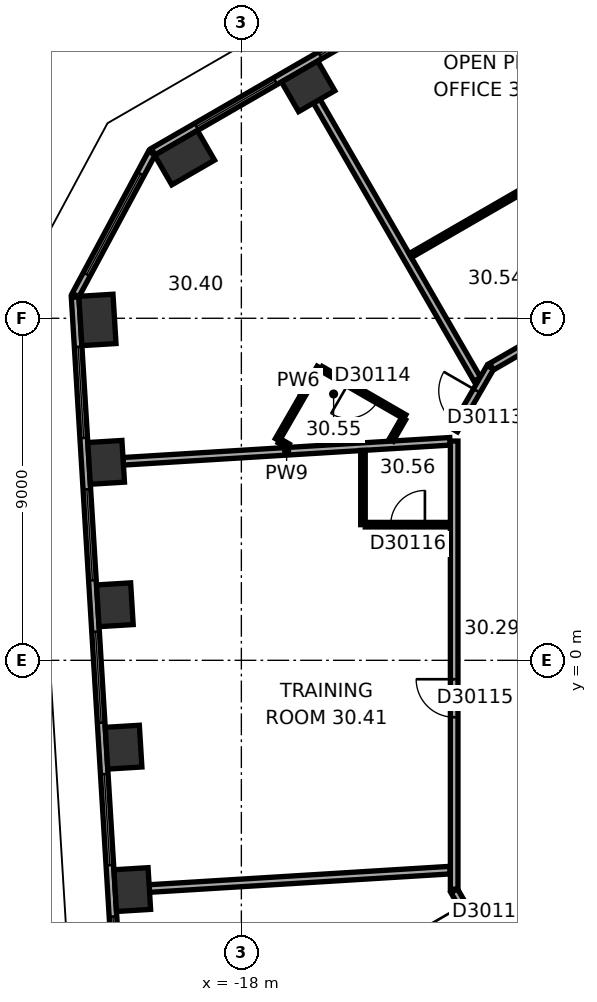
"""IFC4 building model, lengths in metres.
Left out: names, types, materials, properties, quantities, classifications, styles, units other than length and angle.
Written with IfcOpenShell. Run it as: python <this file> out.ifc"""

import sys

from ifc_helpers import new_model, si_unit, direction, frame, frame_2d, origin, origin_2d, place, context, subcontext, project, spatial, rectangle, extrude, element, fill, save


model = new_model("IFC4")
c1 = context("Model", 3, precision=1e-05, world=origin(), true_north=direction((0.0, 1.0)))
c2 = subcontext(c1, "Body", "Model", "MODEL_VIEW")
j1 = project(units=[si_unit("LENGTHUNIT", "METRE"), si_unit("PLANEANGLEUNIT", "RADIAN")], contexts=[c1])
p1 = place(None, origin())
s1 = spatial("IfcSite", under=j1, at=p1, CompositionType="ELEMENT")
p2 = place(p1, origin())
s2 = spatial("IfcBuilding", under=s1, at=p2, CompositionType="ELEMENT")
p3 = place(p2, frame((0.0, 0.0, 124.4)))
s3 = spatial("IfcBuildingStorey", under=s2, at=p3, CompositionType="ELEMENT", Elevation=124.4)
p4 = place(p3, frame((-16.242, 15.102, 0.0), z_axis=(0.0, 0.0, 1.0), x_axis=(-0.866025403784, -0.5, 0.0)))
e1 = element("IfcColumn", 1, at=p4, inside=s3, PredefinedType="COLUMN", context=c2, shape_type="SweptSolid", body=[
    extrude(rectangle(XDim=1.1, YDim=0.9, at=origin_2d()), origin(), (0.0, 0.0, 1.0), 3.7),
])
for number, where, z_axis, x_axis in (
    (2, (-19.494, 13.225, 0.0), (0.0, 0.0, 1.0), (-0.866, -0.5, 0.0)),
    (3, (-21.787, 8.956, 0.0), (0.0, 0.0, 1.0), (0.061, -0.998, 0.0)),
):
    element("IfcColumn", number, at=place(p3, frame(where, z_axis=z_axis, x_axis=x_axis)), inside=s3, PredefinedType="COLUMN", context=c2, shape_type="SweptSolid", body=[
        extrude(rectangle(XDim=1.3, YDim=0.9, at=origin_2d()), origin(), (0.0, 0.0, 1.0), 3.7),
    ])
for number, where, z_axis, x_axis in (
    (4, (-21.558, 5.209, 0.0), (0.0, 0.0, 1.0), (0.061, -0.998, 0.0)),
    (5, (-21.329, 1.462, 0.0), (0.0, 0.0, 1.0), (0.061, -0.998, 0.0)),
    (6, (-21.1, -2.285, 0.0), (0.0, 0.0, 1.0), (0.061, -0.998, 0.0)),
    (7, (-20.871, -6.032, 0.0), (0.0, 0.0, 1.0), (0.061, -0.998, 0.0)),
):
    element("IfcColumn", number, at=place(p3, frame(where, z_axis=z_axis, x_axis=x_axis)), inside=s3, PredefinedType="COLUMN", context=c2, shape_type="SweptSolid", body=[
        extrude(rectangle(XDim=1.1, YDim=0.9, at=origin_2d()), origin(), (0.0, 0.0, 1.0), 3.7),
    ])
p5 = place(p3, frame((-2.961, 23.405, 0.0), z_axis=(0.0, 0.0, 1.0), x_axis=(-0.866023315909, -0.500003616288, 0.0)))
e8 = element("IfcWall", 8, at=p5, inside=s3, PredefinedType="STANDARD", context=c2, shape_type="SweptSolid", body=[
    extrude(rectangle(XDim=20.044, YDim=0.2, at=frame_2d((10.022, 0.0))), origin(), (0.0, 0.0, 1.0), 3.7),
])
p6 = place(p5, frame((1.314, 0.0, 0.9)))
e9 = element("IfcOpeningElement", 9, at=p6, cuts=e8, PredefinedType="OPENING", context=c2, shape_type="SweptSolid", body=[
    extrude(rectangle(XDim=2.4, YDim=2.0, at=frame_2d((1.2, 1.0))), frame((0.0, 0.11, 0.0), z_axis=(0.0, -1.0, 0.0), x_axis=(1.0, 0.0, 0.0)), (0.0, 0.0, 1.0), 0.22),
])
p7 = place(p5, frame((5.069, 0.0, 0.9)))
e10 = element("IfcOpeningElement", 10, at=p7, cuts=e8, PredefinedType="OPENING", context=c2, shape_type="SweptSolid", body=[
    extrude(rectangle(XDim=2.4, YDim=2.0, at=frame_2d((1.2, 1.0))), frame((0.0, 0.11, 0.0), z_axis=(0.0, -1.0, 0.0), x_axis=(1.0, 0.0, 0.0)), (0.0, 0.0, 1.0), 0.22),
])
p8 = place(p5, frame((8.823, 0.0, 0.9)))
e11 = element("IfcOpeningElement", 11, at=p8, cuts=e8, PredefinedType="OPENING", context=c2, shape_type="SweptSolid", body=[
    extrude(rectangle(XDim=2.4, YDim=2.0, at=frame_2d((1.2, 1.0))), frame((0.0, 0.11, 0.0), z_axis=(0.0, -1.0, 0.0), x_axis=(1.0, 0.0, 0.0)), (0.0, 0.0, 1.0), 0.22),
])
p9 = place(p5, frame((12.577, 0.0, 0.9)))
e12 = element("IfcOpeningElement", 12, at=p9, cuts=e8, PredefinedType="OPENING", context=c2, shape_type="SweptSolid", body=[
    extrude(rectangle(XDim=2.4, YDim=2.0, at=frame_2d((1.2, 1.0))), frame((0.0, 0.11, 0.0), z_axis=(0.0, -1.0, 0.0), x_axis=(1.0, 0.0, 0.0)), (0.0, 0.0, 1.0), 0.22),
])
p10 = place(p5, frame((16.331, 0.0, 0.9)))
e13 = element("IfcOpeningElement", 13, at=p10, cuts=e8, PredefinedType="OPENING", context=c2, shape_type="SweptSolid", body=[
    extrude(rectangle(XDim=2.4, YDim=2.0, at=frame_2d((1.2, 1.0))), frame((0.0, 0.11, 0.0), z_axis=(0.0, -1.0, 0.0), x_axis=(1.0, 0.0, 0.0)), (0.0, 0.0, 1.0), 0.22),
])
p11 = place(p3, frame((-20.357, 13.344, 0.0), z_axis=(0.0, 0.0, 1.0), x_axis=(-0.473288913494, -0.880907262068, 0.0)))
e14 = element("IfcWall", 14, at=p11, inside=s3, PredefinedType="STANDARD", context=c2, shape_type="SweptSolid", body=[
    extrude(rectangle(XDim=4.238, YDim=0.2, at=frame_2d((2.119, 0.0))), origin(), (0.0, 0.0, 1.0), 3.7),
])
p12 = place(p11, frame((0.619, 0.0, 0.9)))
e15 = element("IfcOpeningElement", 15, at=p12, cuts=e14, PredefinedType="OPENING", context=c2, shape_type="SweptSolid", body=[
    extrude(rectangle(XDim=3.0, YDim=2.0, at=frame_2d((1.5, 1.0))), frame((0.0, 0.11, 0.0), z_axis=(0.0, -1.0, 0.0), x_axis=(1.0, 0.0, 0.0)), (0.0, 0.0, 1.0), 0.22),
])
p13 = place(p3, frame((-22.375, 9.557, 0.0), z_axis=(0.0, 0.0, 1.0), x_axis=(0.061036015339, -0.998135564356, 0.0)))
e16 = element("IfcWall", 16, at=p13, inside=s3, PredefinedType="STANDARD", context=c2, shape_type="SweptSolid", body=[
    extrude(rectangle(XDim=20.044, YDim=0.2, at=frame_2d((10.022, 0.0))), origin(), (0.0, 0.0, 1.0), 3.7),
])
p14 = place(p13, frame((1.313, 0.0, 0.9)))
e17 = element("IfcOpeningElement", 17, at=p14, cuts=e16, PredefinedType="OPENING", context=c2, shape_type="SweptSolid", body=[
    extrude(rectangle(XDim=2.4, YDim=2.0, at=frame_2d((1.2, 1.0))), frame((0.0, 0.11, 0.0), z_axis=(0.0, -1.0, 0.0), x_axis=(1.0, 0.0, 0.0)), (0.0, 0.0, 1.0), 0.22),
])
p15 = place(p13, frame((5.067, 0.0, 0.9)))
e18 = element("IfcOpeningElement", 18, at=p15, cuts=e16, PredefinedType="OPENING", context=c2, shape_type="SweptSolid", body=[
    extrude(rectangle(XDim=2.4, YDim=2.0, at=frame_2d((1.2, 1.0))), frame((0.0, 0.11, 0.0), z_axis=(0.0, -1.0, 0.0), x_axis=(1.0, 0.0, 0.0)), (0.0, 0.0, 1.0), 0.22),
])
p16 = place(p13, frame((8.821, 0.0, 0.9)))
e19 = element("IfcOpeningElement", 19, at=p16, cuts=e16, PredefinedType="OPENING", context=c2, shape_type="SweptSolid", body=[
    extrude(rectangle(XDim=2.4, YDim=2.0, at=frame_2d((1.2, 1.0))), frame((0.0, 0.11, 0.0), z_axis=(0.0, -1.0, 0.0), x_axis=(1.0, 0.0, 0.0)), (0.0, 0.0, 1.0), 0.22),
])
p17 = place(p13, frame((12.575, 0.0, 0.9)))
e20 = element("IfcOpeningElement", 20, at=p17, cuts=e16, PredefinedType="OPENING", context=c2, shape_type="SweptSolid", body=[
    extrude(rectangle(XDim=2.4, YDim=2.0, at=frame_2d((1.2, 1.0))), frame((0.0, 0.11, 0.0), z_axis=(0.0, -1.0, 0.0), x_axis=(1.0, 0.0, 0.0)), (0.0, 0.0, 1.0), 0.22),
])
p18 = place(p13, frame((16.329, 0.0, 0.9)))
e21 = element("IfcOpeningElement", 21, at=p18, cuts=e16, PredefinedType="OPENING", context=c2, shape_type="SweptSolid", body=[
    extrude(rectangle(XDim=2.4, YDim=2.0, at=frame_2d((1.2, 1.0))), frame((0.0, 0.11, 0.0), z_axis=(0.0, -1.0, 0.0), x_axis=(1.0, 0.0, 0.0)), (0.0, 0.0, 1.0), 0.22),
])
p19 = place(p3, frame((-21.109, 5.237, 0.0), z_axis=(0.0, 0.0, 1.0), x_axis=(0.998135264293, 0.061040922131, 0.0)))
e22 = element("IfcWall", 22, at=p19, inside=s3, PredefinedType="PARTITIONING", context=c2, shape_type="SweptSolid", body=[
    extrude(rectangle(XDim=8.615, YDim=0.2, at=frame_2d((4.308, 0.0))), origin(), (0.0, 0.0, 1.0), 3.42),
])
p20 = place(p3, frame((-20.421, -6.005, 0.0), z_axis=(0.0, 0.0, 1.0), x_axis=(0.998134865741, 0.061047438866, 0.0)))
e23 = element("IfcWall", 23, at=p20, inside=s3, PredefinedType="PARTITIONING", context=c2, shape_type="SweptSolid", body=[
    extrude(rectangle(XDim=7.927, YDim=0.2, at=frame_2d((3.963, 0.0))), origin(), (0.0, 0.0, 1.0), 2.87),
])
p21 = place(p3, frame((-17.052, 5.804, 0.0), z_axis=(0.0, 0.0, 1.0), x_axis=(0.50002983664, 0.866008176907, 0.0)))
e24 = element("IfcWall", 24, at=p21, inside=s3, PredefinedType="PARTITIONING", context=c2, shape_type="SweptSolid", body=[
    extrude(rectangle(XDim=2.2, YDim=0.12, at=frame_2d((1.1, 0.0))), origin(), (0.0, 0.0, 1.0), 3.42),
])
p22 = place(p3, frame((-16.769, 5.64, 0.0), z_axis=(0.0, 0.0, 1.0), x_axis=(-0.865926680471, 0.500170954823, 0.0)))
e25 = element("IfcWall", 25, at=p22, inside=s3, PredefinedType="PARTITIONING", context=c2, shape_type="SweptSolid", body=[
    extrude(rectangle(XDim=0.267, YDim=0.12, at=frame_2d((0.134, 0.0))), origin(), (0.0, 0.0, 1.0), 3.42),
])
p23 = place(p3, frame((-16.018, 14.712, 0.0), z_axis=(0.0, 0.0, 1.0), x_axis=(0.500000843414, -0.866024916838, 0.0)))
e26 = element("IfcWall", 26, at=p23, inside=s3, PredefinedType="PARTITIONING", context=c2, shape_type="SweptSolid", body=[
    extrude(rectangle(XDim=8.452, YDim=0.2, at=frame_2d((4.226, 0.0))), origin(), (0.0, 0.0, 1.0), 3.42),
])
p24 = place(p3, frame((-15.9, 7.679, 0.0), z_axis=(0.0, 0.0, 1.0), x_axis=(0.866022320763, -0.500005339912, 0.0)))
e27 = element("IfcWall", 27, at=p24, inside=s3, PredefinedType="PARTITIONING", context=c2, shape_type="SweptSolid", body=[
    extrude(rectangle(XDim=2.54, YDim=0.12, at=frame_2d((1.27, 0.0))), origin(), (0.0, 0.0, 1.0), 3.42),
])
p25 = place(p24, frame((0.82, 0.0, 0.0)))
e28 = element("IfcOpeningElement", 28, at=p25, cuts=e27, PredefinedType="OPENING", context=c2, shape_type="SweptSolid", body=[
    extrude(rectangle(XDim=0.9, YDim=2.1, at=frame_2d((0.45, 1.05))), frame((0.0, 0.07, 0.0), z_axis=(0.0, -1.0, 0.0), x_axis=(1.0, 0.0, 0.0)), (0.0, 0.0, 1.0), 0.14),
])
p26 = place(p3, frame((-14.8, 3.569, 0.0), z_axis=(0.0, 0.0, 1.0), x_axis=(0.0, 1.0, 0.0)))
e29 = element("IfcWall", 29, at=p26, inside=s3, PredefinedType="PARTITIONING", context=c2, shape_type="SweptSolid", body=[
    extrude(rectangle(XDim=1.953, YDim=0.12, at=frame_2d((0.977, 0.0))), origin(), (0.0, 0.0, 1.0), 3.42),
])
p27 = place(p3, frame((-13.731, 6.357, 0.0), z_axis=(0.0, 0.0, 1.0), x_axis=(-0.500090215447, -0.865973311606, 0.0)))
e30 = element("IfcWall", 30, at=p27, inside=s3, PredefinedType="PARTITIONING", context=c2, shape_type="SweptSolid", body=[
    extrude(rectangle(XDim=0.651, YDim=0.12, at=frame_2d((0.326, 0.0))), origin(), (0.0, 0.0, 1.0), 3.42),
])
p28 = place(p3, frame((-13.556, 10.649, 0.0), z_axis=(0.0, 0.0, 1.0), x_axis=(0.866020939036, 0.500007733091, 0.0)))
e31 = element("IfcWall", 31, at=p28, inside=s3, PredefinedType="PARTITIONING", context=c2, shape_type="SweptSolid", body=[
    extrude(rectangle(XDim=3.753, YDim=0.12, at=frame_2d((1.877, 0.0))), origin(), (0.0, 0.0, 1.0), 3.42),
])
p29 = place(p3, frame((-12.5, 3.569, 0.0), z_axis=(0.0, 0.0, 1.0), x_axis=(-1.0, 0.0, 0.0)))
e32 = element("IfcWall", 32, at=p29, inside=s3, PredefinedType="PARTITIONING", context=c2, shape_type="SweptSolid", body=[
    extrude(rectangle(XDim=2.24, YDim=0.12, at=frame_2d((1.12, 0.0))), origin(), (0.0, 0.0, 1.0), 3.42),
])
p30 = place(p29, frame((0.67, 0.0, 0.0)))
e33 = element("IfcOpeningElement", 33, at=p30, cuts=e32, PredefinedType="OPENING", context=c2, shape_type="SweptSolid", body=[
    extrude(rectangle(XDim=0.9, YDim=2.1, at=frame_2d((0.45, 1.05))), frame((0.0, 0.07, 0.0), z_axis=(0.0, -1.0, 0.0), x_axis=(1.0, 0.0, 0.0)), (0.0, 0.0, 1.0), 0.14),
])
p31 = place(p3, frame((-12.4, -6.062, 0.0), z_axis=(0.0, 0.0, 1.0), x_axis=(0.500022797313, -0.86601224135, 0.0)))
e34 = element("IfcWall", 34, at=p31, inside=s3, PredefinedType="PARTITIONING", context=c2, shape_type="SweptSolid", body=[
    extrude(rectangle(XDim=1.9, YDim=0.2, at=frame_2d((0.95, 0.0))), origin(), (0.0, 0.0, 1.0), 3.42),
])
p32 = place(p31, frame((0.45, 0.0, 0.0)))
e35 = element("IfcOpeningElement", 35, at=p32, cuts=e34, PredefinedType="OPENING", context=c2, shape_type="SweptSolid", body=[
    extrude(rectangle(XDim=1.0, YDim=2.1, at=frame_2d((0.5, 1.05))), frame((0.0, 0.11, 0.0), z_axis=(0.0, -1.0, 0.0), x_axis=(1.0, 0.0, 0.0)), (0.0, 0.0, 1.0), 0.22),
])
p33 = place(p3, frame((-12.4, 5.769, 0.0), z_axis=(0.0, 0.0, 1.0), x_axis=(0.0, -1.0, 0.0)))
e36 = element("IfcWall", 36, at=p33, inside=s3, PredefinedType="PARTITIONING", context=c2, shape_type="SweptSolid", body=[
    extrude(rectangle(XDim=11.792, YDim=0.2, at=frame_2d((5.896, 0.0))), origin(), (0.0, 0.0, 1.0), 3.42),
])
p34 = place(p33, frame((6.267, 0.0, 0.0)))
e37 = element("IfcOpeningElement", 37, at=p34, cuts=e36, PredefinedType="OPENING", context=c2, shape_type="SweptSolid", body=[
    extrude(rectangle(XDim=1.0, YDim=2.1, at=frame_2d((0.5, 1.05))), frame((0.0, 0.11, 0.0), z_axis=(0.0, -1.0, 0.0), x_axis=(1.0, 0.0, 0.0)), (0.0, 0.0, 1.0), 0.22),
])
p35 = place(p3, frame((-11.45, 7.708, 0.0), z_axis=(0.0, 0.0, 1.0), x_axis=(-0.500022797313, -0.86601224135, 0.0)))
e38 = element("IfcWall", 38, at=p35, inside=s3, PredefinedType="PARTITIONING", context=c2, shape_type="SweptSolid", body=[
    extrude(rectangle(XDim=1.9, YDim=0.2, at=frame_2d((0.95, 0.0))), origin(), (0.0, 0.0, 1.0), 3.42),
])
p36 = place(p35, frame((0.712, 0.0, 0.0)))
e39 = element("IfcOpeningElement", 39, at=p36, cuts=e38, PredefinedType="OPENING", context=c2, shape_type="SweptSolid", body=[
    extrude(rectangle(XDim=1.0, YDim=2.1, at=frame_2d((0.5, 1.05))), frame((0.0, 0.11, 0.0), z_axis=(0.0, -1.0, 0.0), x_axis=(1.0, 0.0, 0.0)), (0.0, 0.0, 1.0), 0.22),
])
p37 = place(p3, frame((-4.209, 11.888, 0.0), z_axis=(0.0, 0.0, 1.0), x_axis=(-0.866020930448, -0.500007747966, 0.0)))
e40 = element("IfcWall", 40, at=p37, inside=s3, PredefinedType="PARTITIONING", context=c2, shape_type="SweptSolid", body=[
    extrude(rectangle(XDim=8.321, YDim=0.2, at=frame_2d((4.161, 0.0))), origin(), (0.0, 0.0, 1.0), 3.42),
])
p38 = place(p37, frame((3.031, 0.0, 0.0)))
e41 = element("IfcOpeningElement", 41, at=p38, cuts=e40, PredefinedType="OPENING", context=c2, shape_type="SweptSolid", body=[
    extrude(rectangle(XDim=1.0, YDim=2.1, at=frame_2d((0.5, 1.05))), frame((0.0, 0.11, 0.0), z_axis=(0.0, -1.0, 0.0), x_axis=(1.0, 0.0, 0.0)), (0.0, 0.0, 1.0), 0.22),
])
p39 = place(p9, origin())
e42 = element("IfcWindow", 42, at=p39, inside=s3, PartitioningType="SINGLE_PANEL", PredefinedType="WINDOW", context=c2, shape_type="SweptSolid", body=[
    extrude(rectangle(XDim=2.4, YDim=2.0, at=frame_2d((1.2, 1.0))), frame((0.0, 0.03, 0.0), z_axis=(0.0, -1.0, 0.0), x_axis=(1.0, 0.0, 0.0)), (0.0, 0.0, 1.0), 0.06),
])
fill(e12, e42)
p40 = place(p10, origin())
e43 = element("IfcWindow", 43, at=p40, inside=s3, PartitioningType="SINGLE_PANEL", PredefinedType="WINDOW", context=c2, shape_type="SweptSolid", body=[
    extrude(rectangle(XDim=2.4, YDim=2.0, at=frame_2d((1.2, 1.0))), frame((0.0, 0.03, 0.0), z_axis=(0.0, -1.0, 0.0), x_axis=(1.0, 0.0, 0.0)), (0.0, 0.0, 1.0), 0.06),
])
fill(e13, e43)
p41 = place(p12, origin())
e44 = element("IfcWindow", 44, at=p41, inside=s3, PartitioningType="SINGLE_PANEL", PredefinedType="WINDOW", context=c2, shape_type="SweptSolid", body=[
    extrude(rectangle(XDim=3.0, YDim=2.0, at=frame_2d((1.5, 1.0))), frame((0.0, 0.03, 0.0), z_axis=(0.0, -1.0, 0.0), x_axis=(1.0, 0.0, 0.0)), (0.0, 0.0, 1.0), 0.06),
])
fill(e15, e44)
p42 = place(p14, origin())
e45 = element("IfcWindow", 45, at=p42, inside=s3, PartitioningType="SINGLE_PANEL", PredefinedType="WINDOW", context=c2, shape_type="SweptSolid", body=[
    extrude(rectangle(XDim=2.4, YDim=2.0, at=frame_2d((1.2, 1.0))), frame((0.0, 0.03, 0.0), z_axis=(0.0, -1.0, 0.0), x_axis=(1.0, 0.0, 0.0)), (0.0, 0.0, 1.0), 0.06),
])
fill(e17, e45)
p43 = place(p15, origin())
e46 = element("IfcWindow", 46, at=p43, inside=s3, PartitioningType="SINGLE_PANEL", PredefinedType="WINDOW", context=c2, shape_type="SweptSolid", body=[
    extrude(rectangle(XDim=2.4, YDim=2.0, at=frame_2d((1.2, 1.0))), frame((0.0, 0.03, 0.0), z_axis=(0.0, -1.0, 0.0), x_axis=(1.0, 0.0, 0.0)), (0.0, 0.0, 1.0), 0.06),
])
fill(e18, e46)
p44 = place(p16, origin())
e47 = element("IfcWindow", 47, at=p44, inside=s3, PartitioningType="SINGLE_PANEL", PredefinedType="WINDOW", context=c2, shape_type="SweptSolid", body=[
    extrude(rectangle(XDim=2.4, YDim=2.0, at=frame_2d((1.2, 1.0))), frame((0.0, 0.03, 0.0), z_axis=(0.0, -1.0, 0.0), x_axis=(1.0, 0.0, 0.0)), (0.0, 0.0, 1.0), 0.06),
])
fill(e19, e47)
p45 = place(p17, origin())
e48 = element("IfcWindow", 48, at=p45, inside=s3, PartitioningType="SINGLE_PANEL", PredefinedType="WINDOW", context=c2, shape_type="SweptSolid", body=[
    extrude(rectangle(XDim=2.4, YDim=2.0, at=frame_2d((1.2, 1.0))), frame((0.0, 0.03, 0.0), z_axis=(0.0, -1.0, 0.0), x_axis=(1.0, 0.0, 0.0)), (0.0, 0.0, 1.0), 0.06),
])
fill(e20, e48)
p46 = place(p18, origin())
e49 = element("IfcWindow", 49, at=p46, inside=s3, PartitioningType="SINGLE_PANEL", PredefinedType="WINDOW", context=c2, shape_type="SweptSolid", body=[
    extrude(rectangle(XDim=2.4, YDim=2.0, at=frame_2d((1.2, 1.0))), frame((0.0, 0.03, 0.0), z_axis=(0.0, -1.0, 0.0), x_axis=(1.0, 0.0, 0.0)), (0.0, 0.0, 1.0), 0.06),
])
fill(e21, e49)
p47 = place(p36, origin())
e50 = element("IfcDoor", 50, at=p47, inside=s3, OperationType="SINGLE_SWING_LEFT", PredefinedType="DOOR", context=c2, shape_type="SweptSolid", body=[
    extrude(rectangle(XDim=1.0, YDim=2.1, at=frame_2d((0.5, 1.05))), frame((0.0, 0.025, 0.0), z_axis=(0.0, -1.0, 0.0), x_axis=(1.0, 0.0, 0.0)), (0.0, 0.0, 1.0), 0.05),
])
fill(e39, e50)
p48 = place(p25, origin())
e51 = element("IfcDoor", 51, at=p48, inside=s3, OperationType="SINGLE_SWING_LEFT", PredefinedType="DOOR", context=c2, shape_type="SweptSolid", body=[
    extrude(rectangle(XDim=0.9, YDim=2.1, at=frame_2d((0.45, 1.05))), frame((0.0, 0.025, 0.0), z_axis=(0.0, -1.0, 0.0), x_axis=(1.0, 0.0, 0.0)), (0.0, 0.0, 1.0), 0.05),
])
fill(e28, e51)
p49 = place(p34, origin())
e52 = element("IfcDoor", 52, at=p49, inside=s3, OperationType="SINGLE_SWING_LEFT", PredefinedType="DOOR", context=c2, shape_type="SweptSolid", body=[
    extrude(rectangle(XDim=1.0, YDim=2.1, at=frame_2d((0.5, 1.05))), frame((0.0, 0.025, 0.0), z_axis=(0.0, -1.0, 0.0), x_axis=(1.0, 0.0, 0.0)), (0.0, 0.0, 1.0), 0.05),
])
fill(e37, e52)
p50 = place(p30, origin())
e53 = element("IfcDoor", 53, at=p50, inside=s3, OperationType="SINGLE_SWING_LEFT", PredefinedType="DOOR", context=c2, shape_type="SweptSolid", body=[
    extrude(rectangle(XDim=0.9, YDim=2.1, at=frame_2d((0.45, 1.05))), frame((0.0, 0.025, 0.0), z_axis=(0.0, -1.0, 0.0), x_axis=(1.0, 0.0, 0.0)), (0.0, 0.0, 1.0), 0.05),
])
fill(e33, e53)
p51 = place(p32, origin())
e54 = element("IfcDoor", 54, at=p51, inside=s3, OperationType="SINGLE_SWING_LEFT", PredefinedType="DOOR", context=c2, shape_type="SweptSolid", body=[
    extrude(rectangle(XDim=1.0, YDim=2.1, at=frame_2d((0.5, 1.05))), frame((0.0, 0.025, 0.0), z_axis=(0.0, -1.0, 0.0), x_axis=(1.0, 0.0, 0.0)), (0.0, 0.0, 1.0), 0.05),
])
fill(e35, e54)
save(model, sys.argv[1])
